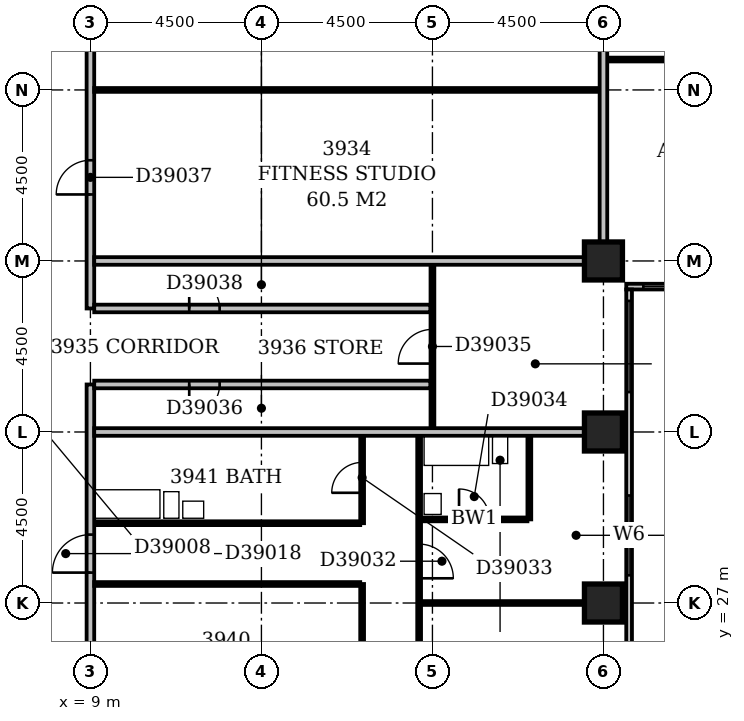
"""IFC4 building model, lengths in metres.
Left out: names, types, materials, properties, quantities, classifications, styles, units other than length and angle.
Written with IfcOpenShell. Run it as: python <this file> out.ifc"""

import sys

from ifc_helpers import new_model, si_unit, direction, frame, frame_2d, origin, origin_2d, place, context, subcontext, project, spatial, rectangle, extrude, element, fill, save


model = new_model("IFC4")
c1 = context("Model", 3, precision=1e-05, world=origin(), true_north=direction((0.0, 1.0)))
c2 = subcontext(c1, "Body", "Model", "MODEL_VIEW")
j1 = project(units=[si_unit("LENGTHUNIT", "METRE"), si_unit("PLANEANGLEUNIT", "RADIAN")], contexts=[c1])
p1 = place(None, origin())
s1 = spatial("IfcSite", under=j1, at=p1, CompositionType="ELEMENT")
p2 = place(p1, origin())
s2 = spatial("IfcBuilding", under=s1, at=p2, CompositionType="ELEMENT")
p3 = place(p2, frame((0.0, 0.0, 155.6)))
s3 = spatial("IfcBuildingStorey", under=s2, at=p3, CompositionType="ELEMENT", Elevation=155.6)
for number, where, z_axis, x_axis in (
    (1, (22.5, 27.0, -0.3), (0.0, 0.0, 1.0), (1.0, 0.0, 0.0)),
    (2, (22.5, 31.5, -0.3), (0.0, 0.0, 1.0), (1.0, 0.0, 0.0)),
    (3, (22.5, 36.0, -0.3), (0.0, 0.0, 1.0), (1.0, 0.0, 0.0)),
):
    element("IfcColumn", number, at=place(p3, frame(where, z_axis=z_axis, x_axis=x_axis)), inside=s3, PredefinedType="COLUMN", context=c2, shape_type="SweptSolid", body=[
        extrude(rectangle(XDim=1.0, YDim=1.0, at=origin_2d()), origin(), (0.0, 0.0, 1.0), 3.6),
    ])
p4 = place(p3, frame((23.175, 17.4, 0.0), z_axis=(0.0, 0.0, 1.0), x_axis=(0.0, 1.0, 0.0)))
e4 = element("IfcWall", 4, at=p4, inside=s3, PredefinedType="STANDARD", context=c2, shape_type="SweptSolid", body=[
    extrude(rectangle(XDim=17.85, YDim=0.15, at=frame_2d((8.925, 0.0))), origin(), (0.0, 0.0, 1.0), 2.7),
])
p5 = place(p4, frame((1.65, 0.0, 0.6)))
e5 = element("IfcOpeningElement", 5, at=p5, cuts=e4, PredefinedType="OPENING", context=c2, shape_type="SweptSolid", body=[
    extrude(rectangle(XDim=2.4, YDim=1.8, at=frame_2d((1.2, 0.9))), frame((0.0, 0.087, 0.0), z_axis=(0.0, -1.0, 0.0), x_axis=(1.0, 0.0, 0.0)), (0.0, 0.0, 1.0), 0.174),
])
p6 = place(p4, frame((6.15, 0.0, 0.6)))
e6 = element("IfcOpeningElement", 6, at=p6, cuts=e4, PredefinedType="OPENING", context=c2, shape_type="SweptSolid", body=[
    extrude(rectangle(XDim=2.4, YDim=1.8, at=frame_2d((1.2, 0.9))), frame((0.0, 0.087, 0.0), z_axis=(0.0, -1.0, 0.0), x_axis=(1.0, 0.0, 0.0)), (0.0, 0.0, 1.0), 0.174),
])
p7 = place(p4, frame((10.329, 0.0, 0.6)))
e7 = element("IfcOpeningElement", 7, at=p7, cuts=e4, PredefinedType="OPENING", context=c2, shape_type="SweptSolid", body=[
    extrude(rectangle(XDim=2.1, YDim=1.8, at=frame_2d((1.05, 0.9))), frame((0.0, 0.087, 0.0), z_axis=(0.0, -1.0, 0.0), x_axis=(1.0, 0.0, 0.0)), (0.0, 0.0, 1.0), 0.174),
])
p8 = place(p4, frame((15.15, 0.0, 0.6)))
e8 = element("IfcOpeningElement", 8, at=p8, cuts=e4, PredefinedType="OPENING", context=c2, shape_type="SweptSolid", body=[
    extrude(rectangle(XDim=2.4, YDim=1.8, at=frame_2d((1.2, 0.9))), frame((0.0, 0.087, 0.0), z_axis=(0.0, -1.0, 0.0), x_axis=(1.0, 0.0, 0.0)), (0.0, 0.0, 1.0), 0.174),
])
p9 = place(p3, frame((23.1, 35.325, 0.0), z_axis=(0.0, 0.0, 1.0), x_axis=(1.0, 0.0, 0.0)))
e9 = element("IfcWall", 9, at=p9, inside=s3, PredefinedType="STANDARD", context=c2, shape_type="SweptSolid", body=[
    extrude(rectangle(XDim=45.15, YDim=0.15, at=frame_2d((22.575, 0.0))), origin(), (0.0, 0.0, 1.0), 2.7),
])
p10 = place(p9, frame((0.45, 0.0, 0.6)))
e10 = element("IfcOpeningElement", 10, at=p10, cuts=e9, PredefinedType="OPENING", context=c2, shape_type="SweptSolid", body=[
    extrude(rectangle(XDim=2.4, YDim=1.8, at=frame_2d((1.2, 0.9))), frame((0.0, 0.087, 0.0), z_axis=(0.0, -1.0, 0.0), x_axis=(1.0, 0.0, 0.0)), (0.0, 0.0, 1.0), 0.174),
])
p11 = place(p9, frame((4.95, 0.0, 0.6)))
e11 = element("IfcOpeningElement", 11, at=p11, cuts=e9, PredefinedType="OPENING", context=c2, shape_type="SweptSolid", body=[
    extrude(rectangle(XDim=2.4, YDim=1.8, at=frame_2d((1.2, 0.9))), frame((0.0, 0.087, 0.0), z_axis=(0.0, -1.0, 0.0), x_axis=(1.0, 0.0, 0.0)), (0.0, 0.0, 1.0), 0.174),
])
p12 = place(p9, frame((10.893, 0.0, 0.6)))
e12 = element("IfcOpeningElement", 12, at=p12, cuts=e9, PredefinedType="OPENING", context=c2, shape_type="SweptSolid", body=[
    extrude(rectangle(XDim=1.2, YDim=1.8, at=frame_2d((0.6, 0.9))), frame((0.0, 0.087, 0.0), z_axis=(0.0, -1.0, 0.0), x_axis=(1.0, 0.0, 0.0)), (0.0, 0.0, 1.0), 0.174),
])
p13 = place(p9, frame((13.653, 0.0, 0.6)))
e13 = element("IfcOpeningElement", 13, at=p13, cuts=e9, PredefinedType="OPENING", context=c2, shape_type="SweptSolid", body=[
    extrude(rectangle(XDim=1.5, YDim=1.8, at=frame_2d((0.75, 0.9))), frame((0.0, 0.087, 0.0), z_axis=(0.0, -1.0, 0.0), x_axis=(1.0, 0.0, 0.0)), (0.0, 0.0, 1.0), 0.174),
])
p14 = place(p9, frame((18.45, 0.0, 0.6)))
e14 = element("IfcOpeningElement", 14, at=p14, cuts=e9, PredefinedType="OPENING", context=c2, shape_type="SweptSolid", body=[
    extrude(rectangle(XDim=2.4, YDim=1.8, at=frame_2d((1.2, 0.9))), frame((0.0, 0.087, 0.0), z_axis=(0.0, -1.0, 0.0), x_axis=(1.0, 0.0, 0.0)), (0.0, 0.0, 1.0), 0.174),
])
p15 = place(p9, frame((22.95, 0.0, 0.6)))
e15 = element("IfcOpeningElement", 15, at=p15, cuts=e9, PredefinedType="OPENING", context=c2, shape_type="SweptSolid", body=[
    extrude(rectangle(XDim=2.4, YDim=1.8, at=frame_2d((1.2, 0.9))), frame((0.0, 0.087, 0.0), z_axis=(0.0, -1.0, 0.0), x_axis=(1.0, 0.0, 0.0)), (0.0, 0.0, 1.0), 0.174),
])
p16 = place(p9, frame((27.45, 0.0, 0.6)))
e16 = element("IfcOpeningElement", 16, at=p16, cuts=e9, PredefinedType="OPENING", context=c2, shape_type="SweptSolid", body=[
    extrude(rectangle(XDim=2.4, YDim=1.8, at=frame_2d((1.2, 0.9))), frame((0.0, 0.087, 0.0), z_axis=(0.0, -1.0, 0.0), x_axis=(1.0, 0.0, 0.0)), (0.0, 0.0, 1.0), 0.174),
])
p17 = place(p9, frame((31.95, 0.0, 0.6)))
e17 = element("IfcOpeningElement", 17, at=p17, cuts=e9, PredefinedType="OPENING", context=c2, shape_type="SweptSolid", body=[
    extrude(rectangle(XDim=2.4, YDim=1.8, at=frame_2d((1.2, 0.9))), frame((0.0, 0.087, 0.0), z_axis=(0.0, -1.0, 0.0), x_axis=(1.0, 0.0, 0.0)), (0.0, 0.0, 1.0), 0.174),
])
p18 = place(p9, frame((36.45, 0.0, 0.6)))
e18 = element("IfcOpeningElement", 18, at=p18, cuts=e9, PredefinedType="OPENING", context=c2, shape_type="SweptSolid", body=[
    extrude(rectangle(XDim=2.4, YDim=1.8, at=frame_2d((1.2, 0.9))), frame((0.0, 0.087, 0.0), z_axis=(0.0, -1.0, 0.0), x_axis=(1.0, 0.0, 0.0)), (0.0, 0.0, 1.0), 0.174),
])
p19 = place(p9, frame((41.27, 0.0, 0.6)))
e19 = element("IfcOpeningElement", 19, at=p19, cuts=e9, PredefinedType="OPENING", context=c2, shape_type="SweptSolid", body=[
    extrude(rectangle(XDim=2.4, YDim=1.8, at=frame_2d((1.2, 0.9))), frame((0.0, 0.087, 0.0), z_axis=(0.0, -1.0, 0.0), x_axis=(1.0, 0.0, 0.0)), (0.0, 0.0, 1.0), 0.174),
])
p20 = place(p3, frame((9.0, 5.0, 0.0), z_axis=(0.0, 0.0, 1.0), x_axis=(0.0, 1.0, 0.0)))
e20 = element("IfcWall", 20, at=p20, inside=s3, PredefinedType="PARTITIONING", context=c2, shape_type="SweptSolid", body=[
    extrude(rectangle(XDim=27.75, YDim=0.2, at=frame_2d((13.875, 0.0))), origin(), (0.0, 0.0, 1.0), 3.3),
])
p21 = place(p20, frame((22.8, 0.0, 0.0)))
e21 = element("IfcOpeningElement", 21, at=p21, cuts=e20, PredefinedType="OPENING", context=c2, shape_type="SweptSolid", body=[
    extrude(rectangle(XDim=1.0, YDim=2.1, at=frame_2d((0.5, 1.05))), frame((0.0, 0.112, 0.0), z_axis=(0.0, -1.0, 0.0), x_axis=(1.0, 0.0, 0.0)), (0.0, 0.0, 1.0), 0.224),
])
p22 = place(p20, frame((14.95, 0.0, 0.0)))
e22 = element("IfcOpeningElement", 22, at=p22, cuts=e20, PredefinedType="OPENING", context=c2, shape_type="SweptSolid", body=[
    extrude(rectangle(XDim=1.0, YDim=2.1, at=frame_2d((0.5, 1.05))), frame((0.0, 0.112, 0.0), z_axis=(0.0, -1.0, 0.0), x_axis=(1.0, 0.0, 0.0)), (0.0, 0.0, 1.0), 0.224),
])
p23 = place(p20, frame((9.3, 0.0, 0.0)))
e23 = element("IfcOpeningElement", 23, at=p23, cuts=e20, PredefinedType="OPENING", context=c2, shape_type="SweptSolid", body=[
    extrude(rectangle(XDim=1.0, YDim=2.1, at=frame_2d((0.5, 1.05))), frame((0.0, 0.112, 0.0), z_axis=(0.0, -1.0, 0.0), x_axis=(1.0, 0.0, 0.0)), (0.0, 0.0, 1.0), 0.224),
])
p24 = place(p20, frame((1.5, 0.0, 0.0)))
e24 = element("IfcOpeningElement", 24, at=p24, cuts=e20, PredefinedType="OPENING", context=c2, shape_type="SweptSolid", body=[
    extrude(rectangle(XDim=0.9, YDim=2.1, at=frame_2d((0.45, 1.05))), frame((0.0, 0.112, 0.0), z_axis=(0.0, -1.0, 0.0), x_axis=(1.0, 0.0, 0.0)), (0.0, 0.0, 1.0), 0.224),
])
p25 = place(p3, frame((16.15, 22.6, 0.0), z_axis=(0.0, 0.0, 1.0), x_axis=(0.0, 1.0, 0.0)))
e25 = element("IfcWall", 25, at=p25, inside=s3, PredefinedType="PARTITIONING", context=c2, shape_type="SweptSolid", body=[
    extrude(rectangle(XDim=4.9, YDim=0.1, at=frame_2d((2.45, 0.0))), origin(), (0.0, 0.0, 1.0), 3.3),
])
p26 = place(p25, frame((1.95, 0.0, 0.0)))
e26 = element("IfcOpeningElement", 26, at=p26, cuts=e25, PredefinedType="OPENING", context=c2, shape_type="SweptSolid", body=[
    extrude(rectangle(XDim=0.9, YDim=2.1, at=frame_2d((0.45, 1.05))), frame((0.0, 0.062, 0.0), z_axis=(0.0, -1.0, 0.0), x_axis=(1.0, 0.0, 0.0)), (0.0, 0.0, 1.0), 0.124),
])
p27 = place(p3, frame((17.65, 22.6, 0.0), z_axis=(0.0, 0.0, 1.0), x_axis=(0.0, 1.0, 0.0)))
e27 = element("IfcWall", 27, at=p27, inside=s3, PredefinedType="PARTITIONING", context=c2, shape_type="SweptSolid", body=[
    extrude(rectangle(XDim=8.8, YDim=0.1, at=frame_2d((4.4, 0.0))), origin(), (0.0, 0.0, 1.0), 3.3),
])
p28 = place(p27, frame((1.7, 0.0, 0.0)))
e28 = element("IfcOpeningElement", 28, at=p28, cuts=e27, PredefinedType="OPENING", context=c2, shape_type="SweptSolid", body=[
    extrude(rectangle(XDim=0.9, YDim=2.1, at=frame_2d((0.45, 1.05))), frame((0.0, 0.062, 0.0), z_axis=(0.0, -1.0, 0.0), x_axis=(1.0, 0.0, 0.0)), (0.0, 0.0, 1.0), 0.124),
])
p29 = place(p27, frame((5.05, 0.0, 0.0)))
e29 = element("IfcOpeningElement", 29, at=p29, cuts=e27, PredefinedType="OPENING", context=c2, shape_type="SweptSolid", body=[
    extrude(rectangle(XDim=0.9, YDim=2.1, at=frame_2d((0.45, 1.05))), frame((0.0, 0.062, 0.0), z_axis=(0.0, -1.0, 0.0), x_axis=(1.0, 0.0, 0.0)), (0.0, 0.0, 1.0), 0.124),
])
p30 = place(p3, frame((17.7, 27.0, 0.0), z_axis=(0.0, 0.0, 1.0), x_axis=(1.0, 0.0, 0.0)))
e30 = element("IfcWall", 30, at=p30, inside=s3, PredefinedType="PARTITIONING", context=c2, shape_type="SweptSolid", body=[
    extrude(rectangle(XDim=4.3, YDim=0.1, at=frame_2d((2.15, 0.0))), origin(), (0.0, 0.0, 1.0), 2.7),
])
p31 = place(p3, frame((9.1, 27.5, 0.0), z_axis=(0.0, 0.0, 1.0), x_axis=(1.0, 0.0, 0.0)))
e31 = element("IfcWall", 31, at=p31, inside=s3, PredefinedType="PARTITIONING", context=c2, shape_type="SweptSolid", body=[
    extrude(rectangle(XDim=7.0, YDim=0.1, at=frame_2d((3.5, 0.0))), origin(), (0.0, 0.0, 1.0), 2.7),
])
p32 = place(p3, frame((9.1, 29.1, 0.0), z_axis=(0.0, 0.0, 1.0), x_axis=(1.0, 0.0, 0.0)))
e32 = element("IfcWall", 32, at=p32, inside=s3, PredefinedType="PLUMBINGWALL", context=c2, shape_type="SweptSolid", body=[
    extrude(rectangle(XDim=7.0, YDim=0.1, at=frame_2d((3.5, 0.0))), origin(), (0.0, 0.0, 1.0), 3.3),
])
p33 = place(p3, frame((16.15, 29.1, 0.0), z_axis=(0.0, 0.0, 1.0), x_axis=(0.0, 1.0, 0.0)))
e33 = element("IfcWall", 33, at=p33, inside=s3, PredefinedType="PARTITIONING", context=c2, shape_type="SweptSolid", body=[
    extrude(rectangle(XDim=2.3, YDim=0.1, at=frame_2d((1.15, 0.0))), origin(), (0.0, 0.0, 1.0), 3.3),
])
p34 = place(p33, frame((0.8, 0.0, 0.0)))
e34 = element("IfcOpeningElement", 34, at=p34, cuts=e33, PredefinedType="OPENING", context=c2, shape_type="SweptSolid", body=[
    extrude(rectangle(XDim=0.8, YDim=2.1, at=frame_2d((0.4, 1.05))), frame((0.0, 0.062, 0.0), z_axis=(0.0, -1.0, 0.0), x_axis=(1.0, 0.0, 0.0)), (0.0, 0.0, 1.0), 0.124),
])
p35 = place(p3, frame((17.7, 29.2, 0.0), z_axis=(0.0, 0.0, 1.0), x_axis=(1.0, 0.0, 0.0)))
e35 = element("IfcWall", 35, at=p35, inside=s3, PredefinedType="PLUMBINGWALL", context=c2, shape_type="SweptSolid", body=[
    extrude(rectangle(XDim=2.8, YDim=0.1, at=frame_2d((1.4, 0.0))), origin(), (0.0, 0.0, 1.0), 3.3),
])
p36 = place(p35, frame((1.0, 0.0, 0.0)))
e36 = element("IfcOpeningElement", 36, at=p36, cuts=e35, PredefinedType="OPENING", context=c2, shape_type="SweptSolid", body=[
    extrude(rectangle(XDim=0.8, YDim=2.1, at=frame_2d((0.4, 1.05))), frame((0.0, 0.062, 0.0), z_axis=(0.0, -1.0, 0.0), x_axis=(1.0, 0.0, 0.0)), (0.0, 0.0, 1.0), 0.124),
])
p37 = place(p3, frame((20.55, 29.2, 0.0), z_axis=(0.0, 0.0, 1.0), x_axis=(0.0, 1.0, 0.0)))
e37 = element("IfcWall", 37, at=p37, inside=s3, PredefinedType="PLUMBINGWALL", context=c2, shape_type="SweptSolid", body=[
    extrude(rectangle(XDim=2.2, YDim=0.1, at=frame_2d((1.1, 0.0))), origin(), (0.0, 0.0, 1.0), 3.3),
])
p38 = place(p3, frame((9.1, 31.5, 0.0), z_axis=(0.0, 0.0, 1.0), x_axis=(1.0, 0.0, 0.0)))
e38 = element("IfcWall", 38, at=p38, inside=s3, PredefinedType="PARTITIONING", context=c2, shape_type="SweptSolid", body=[
    extrude(rectangle(XDim=12.9, YDim=0.2, at=frame_2d((6.45, 0.0))), origin(), (0.0, 0.0, 1.0), 3.3),
])
p39 = place(p3, frame((18.0, 31.6, 0.0), z_axis=(0.0, 0.0, 1.0), x_axis=(0.0, 1.0, 0.0)))
e39 = element("IfcWall", 39, at=p39, inside=s3, PredefinedType="PARTITIONING", context=c2, shape_type="SweptSolid", body=[
    extrude(rectangle(XDim=4.3, YDim=0.1, at=frame_2d((2.15, 0.0))), origin(), (0.0, 0.0, 1.0), 3.3),
])
p40 = place(p39, frame((1.7, 0.0, 0.0)))
e40 = element("IfcOpeningElement", 40, at=p40, cuts=e39, PredefinedType="OPENING", context=c2, shape_type="SweptSolid", body=[
    extrude(rectangle(XDim=0.9, YDim=2.1, at=frame_2d((0.45, 1.05))), frame((0.0, 0.062, 0.0), z_axis=(0.0, -1.0, 0.0), x_axis=(1.0, 0.0, 0.0)), (0.0, 0.0, 1.0), 0.124),
])
p41 = place(p3, frame((9.1, 32.75, 0.0), z_axis=(0.0, 0.0, 1.0), x_axis=(1.0, 0.0, 0.0)))
e41 = element("IfcWall", 41, at=p41, inside=s3, PredefinedType="PARTITIONING", context=c2, shape_type="SweptSolid", body=[
    extrude(rectangle(XDim=8.85, YDim=0.2, at=frame_2d((4.425, 0.0))), origin(), (0.0, 0.0, 1.0), 3.3),
])
p42 = place(p41, frame((2.5, 0.0, 0.0)))
e42 = element("IfcOpeningElement", 42, at=p42, cuts=e41, PredefinedType="OPENING", context=c2, shape_type="SweptSolid", body=[
    extrude(rectangle(XDim=0.8, YDim=2.1, at=frame_2d((0.4, 1.05))), frame((0.0, 0.112, 0.0), z_axis=(0.0, -1.0, 0.0), x_axis=(1.0, 0.0, 0.0)), (0.0, 0.0, 1.0), 0.224),
])
p43 = place(p3, frame((9.0, 34.75, 0.0), z_axis=(0.0, 0.0, 1.0), x_axis=(0.0, 1.0, 0.0)))
e43 = element("IfcWall", 43, at=p43, inside=s3, PredefinedType="PARTITIONING", context=c2, shape_type="SweptSolid", body=[
    extrude(rectangle(XDim=14.75, YDim=0.2, at=frame_2d((7.375, 0.0))), origin(), (0.0, 0.0, 1.0), 3.3),
])
p44 = place(p43, frame((3.0, 0.0, 0.0)))
e44 = element("IfcOpeningElement", 44, at=p44, cuts=e43, PredefinedType="OPENING", context=c2, shape_type="SweptSolid", body=[
    extrude(rectangle(XDim=0.9, YDim=2.1, at=frame_2d((0.45, 1.05))), frame((0.0, 0.112, 0.0), z_axis=(0.0, -1.0, 0.0), x_axis=(1.0, 0.0, 0.0)), (0.0, 0.0, 1.0), 0.224),
])
p45 = place(p3, frame((9.1, 34.75, 0.0), z_axis=(0.0, 0.0, 1.0), x_axis=(1.0, 0.0, 0.0)))
e45 = element("IfcWall", 45, at=p45, inside=s3, PredefinedType="PARTITIONING", context=c2, shape_type="SweptSolid", body=[
    extrude(rectangle(XDim=8.85, YDim=0.2, at=frame_2d((4.425, 0.0))), origin(), (0.0, 0.0, 1.0), 3.3),
])
p46 = place(p45, frame((2.5, 0.0, 0.0)))
e46 = element("IfcOpeningElement", 46, at=p46, cuts=e45, PredefinedType="OPENING", context=c2, shape_type="SweptSolid", body=[
    extrude(rectangle(XDim=0.8, YDim=2.1, at=frame_2d((0.4, 1.05))), frame((0.0, 0.112, 0.0), z_axis=(0.0, -1.0, 0.0), x_axis=(1.0, 0.0, 0.0)), (0.0, 0.0, 1.0), 0.224),
])
for number, where, z_axis, x_axis in (
    (47, (9.1, 36.0, 0.0), (0.0, 0.0, 1.0), (1.0, 0.0, 0.0)),
    (48, (22.5, 36.5, 0.0), (0.0, 0.0, 1.0), (0.0, 1.0, 0.0)),
):
    element("IfcWall", number, at=place(p3, frame(where, z_axis=z_axis, x_axis=x_axis)), inside=s3, PredefinedType="PARTITIONING", context=c2, shape_type="SweptSolid", body=[
        extrude(rectangle(XDim=12.9, YDim=0.2, at=frame_2d((6.45, 0.0))), origin(), (0.0, 0.0, 1.0), 3.3),
    ])
p47 = place(p3, frame((9.1, 40.5, 0.0), z_axis=(0.0, 0.0, 1.0), x_axis=(1.0, 0.0, 0.0)))
e49 = element("IfcWall", 49, at=p47, inside=s3, PredefinedType="PARTITIONING", context=c2, shape_type="SweptSolid", body=[
    extrude(rectangle(XDim=13.3, YDim=0.1, at=frame_2d((6.65, 0.0))), origin(), (0.0, 0.0, 1.0), 3.3),
])
p48 = place(p3, frame((22.6, 41.3, 0.0), z_axis=(0.0, 0.0, 1.0), x_axis=(1.0, 0.0, 0.0)))
e50 = element("IfcWall", 50, at=p48, inside=s3, PredefinedType="PARTITIONING", context=c2, shape_type="SweptSolid", body=[
    extrude(rectangle(XDim=17.8, YDim=0.1, at=frame_2d((8.9, 0.0))), origin(), (0.0, 0.0, 1.0), 3.3),
])
p49 = place(p48, frame((3.9, 0.0, 0.0)))
e51 = element("IfcOpeningElement", 51, at=p49, cuts=e50, PredefinedType="OPENING", context=c2, shape_type="SweptSolid", body=[
    extrude(rectangle(XDim=0.9, YDim=2.1, at=frame_2d((0.45, 1.05))), frame((0.0, 0.062, 0.0), z_axis=(0.0, -1.0, 0.0), x_axis=(1.0, 0.0, 0.0)), (0.0, 0.0, 1.0), 0.124),
])
p50 = place(p48, frame((10.7, 0.0, 0.0)))
e52 = element("IfcOpeningElement", 52, at=p50, cuts=e50, PredefinedType="OPENING", context=c2, shape_type="SweptSolid", body=[
    extrude(rectangle(XDim=0.9, YDim=2.1, at=frame_2d((0.45, 1.05))), frame((0.0, 0.062, 0.0), z_axis=(0.0, -1.0, 0.0), x_axis=(1.0, 0.0, 0.0)), (0.0, 0.0, 1.0), 0.124),
])
p51 = place(p48, frame((14.05, 0.0, 0.0)))
e53 = element("IfcOpeningElement", 53, at=p51, cuts=e50, PredefinedType="OPENING", context=c2, shape_type="SweptSolid", body=[
    extrude(rectangle(XDim=0.9, YDim=2.1, at=frame_2d((0.45, 1.05))), frame((0.0, 0.062, 0.0), z_axis=(0.0, -1.0, 0.0), x_axis=(1.0, 0.0, 0.0)), (0.0, 0.0, 1.0), 0.124),
])
p52 = place(p7, origin())
e54 = element("IfcWindow", 54, at=p52, inside=s3, PartitioningType="SINGLE_PANEL", PredefinedType="WINDOW", context=c2, shape_type="SweptSolid", body=[
    extrude(rectangle(XDim=2.1, YDim=1.8, at=frame_2d((1.05, 0.9))), frame((0.0, 0.03, 0.0), z_axis=(0.0, -1.0, 0.0), x_axis=(1.0, 0.0, 0.0)), (0.0, 0.0, 1.0), 0.06),
])
fill(e7, e54)
p53 = place(p8, origin())
e55 = element("IfcWindow", 55, at=p53, inside=s3, PartitioningType="SINGLE_PANEL", PredefinedType="WINDOW", context=c2, shape_type="SweptSolid", body=[
    extrude(rectangle(XDim=2.4, YDim=1.8, at=frame_2d((1.2, 0.9))), frame((0.0, 0.03, 0.0), z_axis=(0.0, -1.0, 0.0), x_axis=(1.0, 0.0, 0.0)), (0.0, 0.0, 1.0), 0.06),
])
fill(e8, e55)
p54 = place(p10, origin())
e56 = element("IfcWindow", 56, at=p54, inside=s3, PartitioningType="SINGLE_PANEL", PredefinedType="WINDOW", context=c2, shape_type="SweptSolid", body=[
    extrude(rectangle(XDim=2.4, YDim=1.8, at=frame_2d((1.2, 0.9))), frame((0.0, 0.03, 0.0), z_axis=(0.0, -1.0, 0.0), x_axis=(1.0, 0.0, 0.0)), (0.0, 0.0, 1.0), 0.06),
])
fill(e10, e56)
p55 = place(p21, origin())
e57 = element("IfcDoor", 57, at=p55, inside=s3, OperationType="SINGLE_SWING_LEFT", PredefinedType="DOOR", context=c2, shape_type="SweptSolid", body=[
    extrude(rectangle(XDim=1.0, YDim=2.1, at=frame_2d((0.5, 1.05))), frame((0.0, 0.025, 0.0), z_axis=(0.0, -1.0, 0.0), x_axis=(1.0, 0.0, 0.0)), (0.0, 0.0, 1.0), 0.05),
])
fill(e21, e57)
p56 = place(p29, frame((0.9, 0.0, 0.0), z_axis=(0.0, 0.0, 1.0), x_axis=(-1.0, 0.0, 0.0)))
e58 = element("IfcDoor", 58, at=p56, inside=s3, OperationType="SINGLE_SWING_RIGHT", PredefinedType="DOOR", context=c2, shape_type="SweptSolid", body=[
    extrude(rectangle(XDim=0.9, YDim=2.1, at=frame_2d((0.45, 1.05))), frame((0.0, 0.025, 0.0), z_axis=(0.0, -1.0, 0.0), x_axis=(1.0, 0.0, 0.0)), (0.0, 0.0, 1.0), 0.05),
])
fill(e29, e58)
p57 = place(p34, origin())
e59 = element("IfcDoor", 59, at=p57, inside=s3, OperationType="SINGLE_SWING_LEFT", PredefinedType="DOOR", context=c2, shape_type="SweptSolid", body=[
    extrude(rectangle(XDim=0.8, YDim=2.1, at=frame_2d((0.4, 1.05))), frame((0.0, 0.025, 0.0), z_axis=(0.0, -1.0, 0.0), x_axis=(1.0, 0.0, 0.0)), (0.0, 0.0, 1.0), 0.05),
])
fill(e34, e59)
p58 = place(p36, origin())
e60 = element("IfcDoor", 60, at=p58, inside=s3, OperationType="SINGLE_SWING_LEFT", PredefinedType="DOOR", context=c2, shape_type="SweptSolid", body=[
    extrude(rectangle(XDim=0.8, YDim=2.1, at=frame_2d((0.4, 1.05))), frame((0.0, 0.025, 0.0), z_axis=(0.0, -1.0, 0.0), x_axis=(1.0, 0.0, 0.0)), (0.0, 0.0, 1.0), 0.05),
])
fill(e36, e60)
p59 = place(p40, origin())
e61 = element("IfcDoor", 61, at=p59, inside=s3, OperationType="SINGLE_SWING_LEFT", PredefinedType="DOOR", context=c2, shape_type="SweptSolid", body=[
    extrude(rectangle(XDim=0.9, YDim=2.1, at=frame_2d((0.45, 1.05))), frame((0.0, 0.025, 0.0), z_axis=(0.0, -1.0, 0.0), x_axis=(1.0, 0.0, 0.0)), (0.0, 0.0, 1.0), 0.05),
])
fill(e40, e61)
p60 = place(p42, frame((0.8, 0.0, 0.0), z_axis=(0.0, 0.0, 1.0), x_axis=(-1.0, 0.0, 0.0)))
e62 = element("IfcDoor", 62, at=p60, inside=s3, OperationType="SINGLE_SWING_RIGHT", PredefinedType="DOOR", context=c2, shape_type="SweptSolid", body=[
    extrude(rectangle(XDim=0.8, YDim=2.1, at=frame_2d((0.4, 1.05))), frame((0.0, 0.025, 0.0), z_axis=(0.0, -1.0, 0.0), x_axis=(1.0, 0.0, 0.0)), (0.0, 0.0, 1.0), 0.05),
])
fill(e42, e62)
p61 = place(p44, origin())
e63 = element("IfcDoor", 63, at=p61, inside=s3, OperationType="SINGLE_SWING_LEFT", PredefinedType="DOOR", context=c2, shape_type="SweptSolid", body=[
    extrude(rectangle(XDim=0.9, YDim=2.1, at=frame_2d((0.45, 1.05))), frame((0.0, 0.025, 0.0), z_axis=(0.0, -1.0, 0.0), x_axis=(1.0, 0.0, 0.0)), (0.0, 0.0, 1.0), 0.05),
])
fill(e44, e63)
p62 = place(p46, origin())
e64 = element("IfcDoor", 64, at=p62, inside=s3, OperationType="SINGLE_SWING_LEFT", PredefinedType="DOOR", context=c2, shape_type="SweptSolid", body=[
    extrude(rectangle(XDim=0.8, YDim=2.1, at=frame_2d((0.4, 1.05))), frame((0.0, 0.025, 0.0), z_axis=(0.0, -1.0, 0.0), x_axis=(1.0, 0.0, 0.0)), (0.0, 0.0, 1.0), 0.05),
])
fill(e46, e64)
save(model, sys.argv[1])
